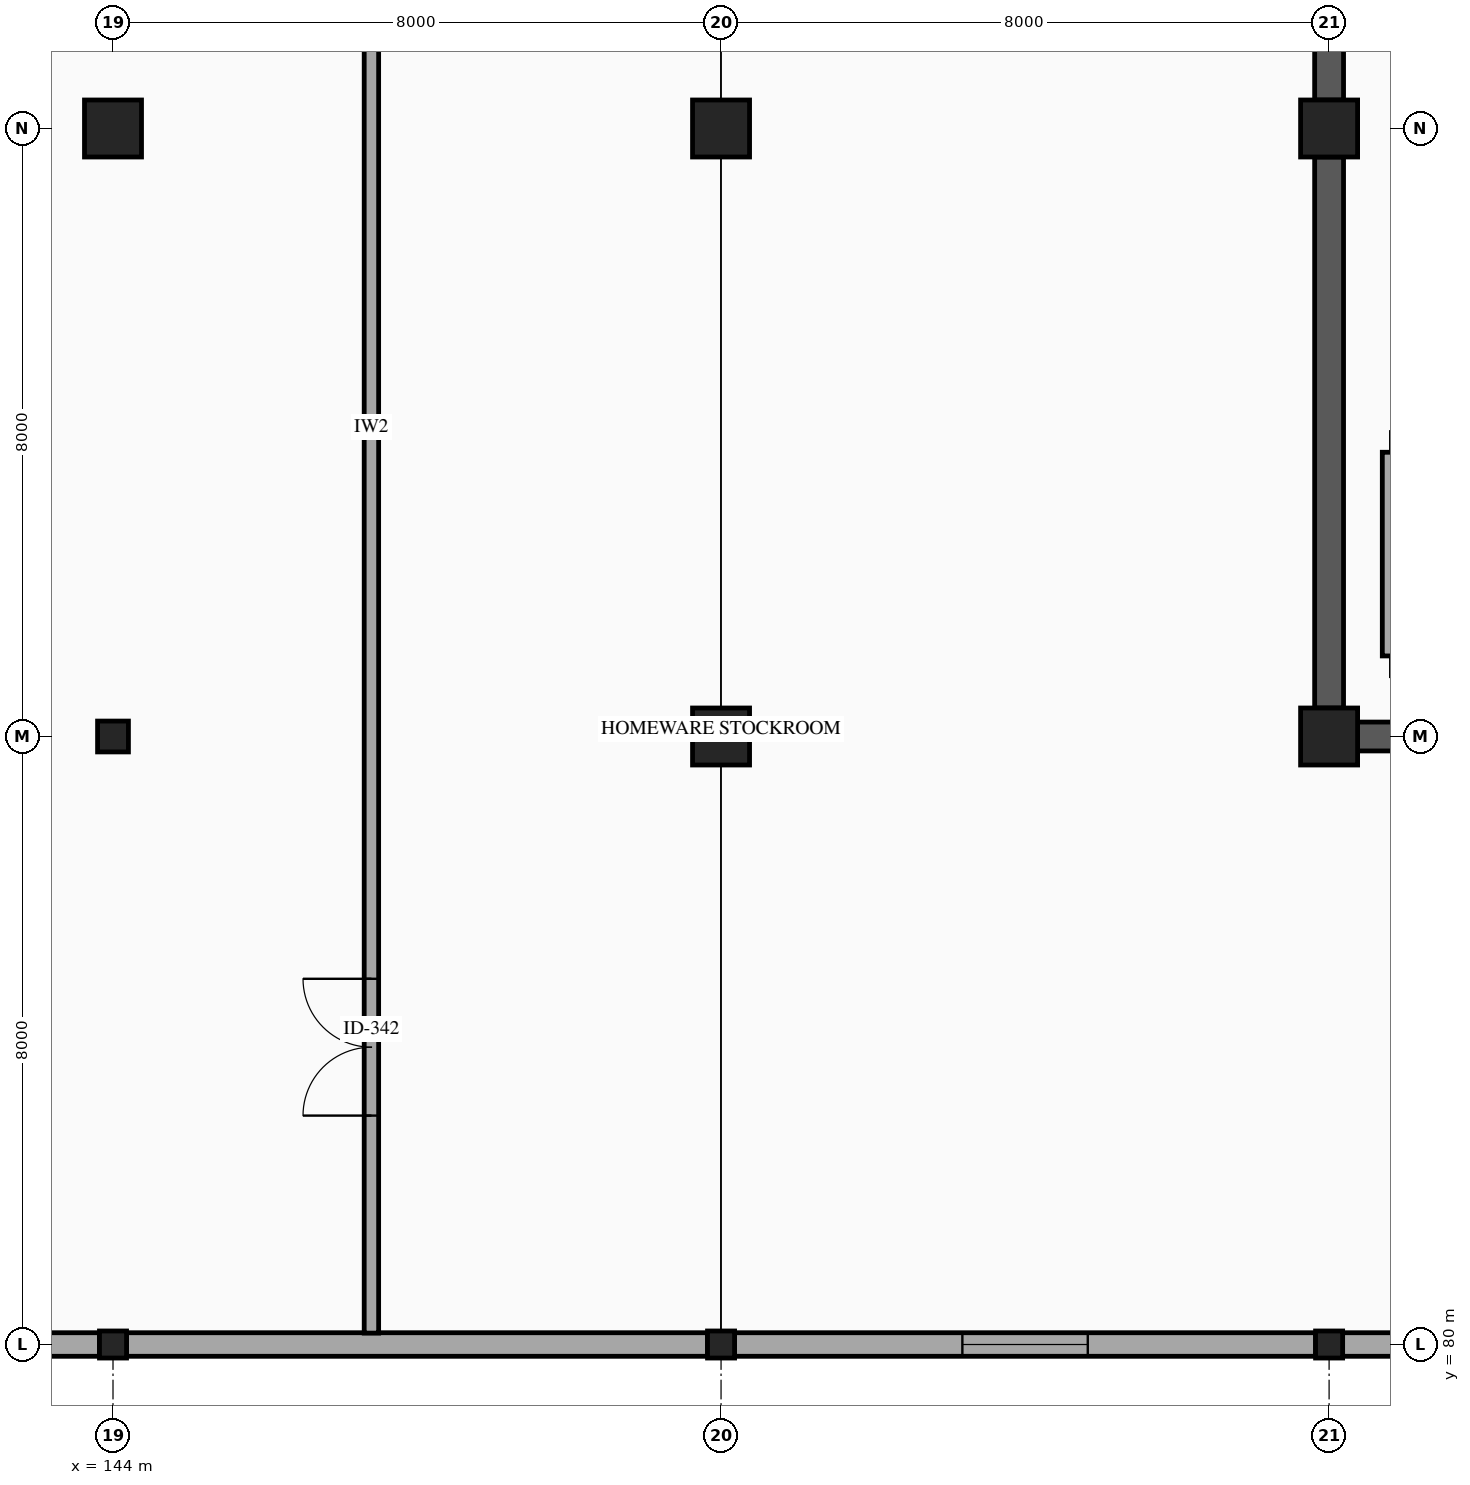
"""IFC4 building model, lengths in metres.
Left out: names, types, materials, properties, quantities, classifications, styles, units other than length and angle.
Written with IfcOpenShell. Run it as: python <this file> out.ifc"""

import sys

from ifc_helpers import new_model, si_unit, direction, frame, frame_2d, origin, origin_2d, place, context, subcontext, project, spatial, rectangle, hollow_rectangle, hollow_circle, extrude, element, fill, save


model = new_model("IFC4")
c1 = context("Model", 3, precision=1e-05, world=origin(), true_north=direction((0.0, 1.0)))
c2 = subcontext(c1, "Body", "Model", "MODEL_VIEW")
j1 = project(units=[si_unit("LENGTHUNIT", "METRE"), si_unit("PLANEANGLEUNIT", "RADIAN")], contexts=[c1])
p1 = place(None, origin())
s1 = spatial("IfcSite", under=j1, at=p1, CompositionType="ELEMENT")
p2 = place(p1, origin())
s2 = spatial("IfcBuilding", under=s1, at=p2, CompositionType="ELEMENT")
p3 = place(p2, frame((0.0, 0.0, 14.9)))
s3 = spatial("IfcBuildingStorey", under=s2, at=p3, CompositionType="ELEMENT", Elevation=14.9)
p4 = place(p3, frame((144.0, 80.0, 0.0), z_axis=(0.0, 0.0, 1.0), x_axis=(1.0, 0.0, 0.0)))
e1 = element("IfcColumn", 1, at=p4, inside=s3, PredefinedType="COLUMN", context=c2, shape_type="SweptSolid", body=[
    extrude(hollow_rectangle(XDim=0.356, YDim=0.356, WallThickness=0.012, InnerFilletRadius=0.012, OuterFilletRadius=0.024, at=origin_2d()), origin(), (0.0, 0.0, 1.0), 4.5),
])
p5 = place(p3, frame((144.0, 88.0, 0.0), z_axis=(0.0, 0.0, 1.0), x_axis=(1.0, 0.0, 0.0)))
e2 = element("IfcColumn", 2, at=p5, inside=s3, PredefinedType="COLUMN", context=c2, shape_type="SweptSolid", body=[
    extrude(hollow_circle(Radius=0.203, WallThickness=0.012, at=origin_2d()), origin(), (0.0, 0.0, 1.0), 4.5),
])
p6 = place(p3, frame((144.0, 96.0, 0.0), z_axis=(0.0, 0.0, 1.0), x_axis=(1.0, 0.0, 0.0)))
e3 = element("IfcColumn", 3, at=p6, inside=s3, PredefinedType="COLUMN", context=c2, shape_type="SweptSolid", body=[
    extrude(rectangle(XDim=0.75, YDim=0.75, at=origin_2d()), origin(), (0.0, 0.0, 1.0), 4.5),
])
p7 = place(p3, frame((152.0, 80.0, 0.0), z_axis=(0.0, 0.0, 1.0), x_axis=(1.0, 0.0, 0.0)))
e4 = element("IfcColumn", 4, at=p7, inside=s3, PredefinedType="COLUMN", context=c2, shape_type="SweptSolid", body=[
    extrude(hollow_rectangle(XDim=0.356, YDim=0.356, WallThickness=0.012, InnerFilletRadius=0.012, OuterFilletRadius=0.024, at=origin_2d()), origin(), (0.0, 0.0, 1.0), 4.5),
])
for number, where, z_axis, x_axis in (
    (5, (152.0, 88.0, 0.0), (0.0, 0.0, 1.0), (1.0, 0.0, 0.0)),
    (6, (152.0, 96.0, 0.0), (0.0, 0.0, 1.0), (1.0, 0.0, 0.0)),
):
    element("IfcColumn", number, at=place(p3, frame(where, z_axis=z_axis, x_axis=x_axis)), inside=s3, PredefinedType="COLUMN", context=c2, shape_type="SweptSolid", body=[
        extrude(rectangle(XDim=0.75, YDim=0.75, at=origin_2d()), origin(), (0.0, 0.0, 1.0), 4.5),
    ])
p8 = place(p3, frame((160.0, 80.0, 0.0), z_axis=(0.0, 0.0, 1.0), x_axis=(1.0, 0.0, 0.0)))
e7 = element("IfcColumn", 7, at=p8, inside=s3, PredefinedType="COLUMN", context=c2, shape_type="SweptSolid", body=[
    extrude(hollow_rectangle(XDim=0.356, YDim=0.356, WallThickness=0.012, InnerFilletRadius=0.012, OuterFilletRadius=0.024, at=origin_2d()), origin(), (0.0, 0.0, 1.0), 4.5),
])
for number, where, z_axis, x_axis in (
    (8, (160.0, 88.0, 0.0), (0.0, 0.0, 1.0), (1.0, 0.0, 0.0)),
    (9, (160.0, 96.0, 0.0), (0.0, 0.0, 1.0), (1.0, 0.0, 0.0)),
):
    element("IfcColumn", number, at=place(p3, frame(where, z_axis=z_axis, x_axis=x_axis)), inside=s3, PredefinedType="COLUMN", context=c2, shape_type="SweptSolid", body=[
        extrude(rectangle(XDim=0.75, YDim=0.75, at=origin_2d()), origin(), (0.0, 0.0, 1.0), 4.5),
    ])
p9 = place(p3, frame((167.822, 80.0, 0.0), z_axis=(0.0, 0.0, 1.0), x_axis=(-1.0, 0.0, 0.0)))
e10 = element("IfcWall", 10, at=p9, inside=s3, PredefinedType="STANDARD", context=c2, shape_type="SweptSolid", body=[
    extrude(rectangle(XDim=7.644, YDim=0.31, at=frame_2d((3.822, 0.0))), origin(), (0.0, 0.0, 1.0), 3.48),
])
p10 = place(p9, frame((2.997, 0.0, 0.8)))
e11 = element("IfcOpeningElement", 11, at=p10, cuts=e10, PredefinedType="OPENING", context=c2, shape_type="SweptSolid", body=[
    extrude(rectangle(XDim=1.65, YDim=2.3, at=frame_2d((0.825, 1.15))), frame((0.0, 0.165, 0.0), z_axis=(0.0, -1.0, 0.0), x_axis=(1.0, 0.0, 0.0)), (0.0, 0.0, 1.0), 0.33),
])
p11 = place(p3, frame((159.822, 80.0, 0.0), z_axis=(0.0, 0.0, 1.0), x_axis=(-1.0, 0.0, 0.0)))
e12 = element("IfcWall", 12, at=p11, inside=s3, PredefinedType="STANDARD", context=c2, shape_type="SweptSolid", body=[
    extrude(rectangle(XDim=7.644, YDim=0.31, at=frame_2d((3.822, 0.0))), origin(), (0.0, 0.0, 1.0), 3.48),
])
p12 = place(p11, frame((2.997, 0.0, 0.8)))
e13 = element("IfcOpeningElement", 13, at=p12, cuts=e12, PredefinedType="OPENING", context=c2, shape_type="SweptSolid", body=[
    extrude(rectangle(XDim=1.65, YDim=2.3, at=frame_2d((0.825, 1.15))), frame((0.0, 0.165, 0.0), z_axis=(0.0, -1.0, 0.0), x_axis=(1.0, 0.0, 0.0)), (0.0, 0.0, 1.0), 0.33),
])
p13 = place(p3, frame((151.822, 80.0, 0.0), z_axis=(0.0, 0.0, 1.0), x_axis=(-1.0, 0.0, 0.0)))
e14 = element("IfcWall", 14, at=p13, inside=s3, PredefinedType="STANDARD", context=c2, shape_type="SweptSolid", body=[
    extrude(rectangle(XDim=7.644, YDim=0.31, at=frame_2d((3.822, 0.0))), origin(), (0.0, 0.0, 1.0), 3.48),
])
p14 = place(p3, frame((143.822, 80.0, 0.0), z_axis=(0.0, 0.0, 1.0), x_axis=(-1.0, 0.0, 0.0)))
e15 = element("IfcWall", 15, at=p14, inside=s3, PredefinedType="STANDARD", context=c2, shape_type="SweptSolid", body=[
    extrude(rectangle(XDim=7.644, YDim=0.31, at=frame_2d((3.822, 0.0))), origin(), (0.0, 0.0, 1.0), 3.48),
])
p15 = place(p14, frame((2.997, 0.0, 0.8)))
e16 = element("IfcOpeningElement", 16, at=p15, cuts=e15, PredefinedType="OPENING", context=c2, shape_type="SweptSolid", body=[
    extrude(rectangle(XDim=1.65, YDim=2.3, at=frame_2d((0.825, 1.15))), frame((0.0, 0.165, 0.0), z_axis=(0.0, -1.0, 0.0), x_axis=(1.0, 0.0, 0.0)), (0.0, 0.0, 1.0), 0.33),
])
for number, where, z_axis, x_axis in (
    (17, (160.375, 88.0, 0.0), (0.0, 0.0, 1.0), (1.0, 0.0, 0.0)),
    (18, (160.0, 88.375, 0.0), (0.0, 0.0, 1.0), (0.0, 1.0, 0.0)),
    (19, (160.0, 96.375, 0.0), (0.0, 0.0, 1.0), (0.0, 1.0, 0.0)),
):
    element("IfcWall", number, at=place(p3, frame(where, z_axis=z_axis, x_axis=x_axis)), inside=s3, PredefinedType="SHEAR", context=c2, shape_type="SweptSolid", body=[
        extrude(rectangle(XDim=7.25, YDim=0.38, at=frame_2d((3.625, 0.0))), origin(), (0.0, 0.0, 1.0), 4.28),
    ])
p16 = place(p3, frame((160.82, 89.06, 0.0), z_axis=(0.0, 0.0, 1.0), x_axis=(0.0, 1.0, 0.0)))
e20 = element("IfcWall", 20, at=p16, inside=s3, PredefinedType="PARTITIONING", context=c2, shape_type="SweptSolid", body=[
    extrude(rectangle(XDim=2.68, YDim=0.24, at=frame_2d((1.34, 0.0))), origin(), (0.0, 0.0, 1.0), 4.28),
])
p17 = place(p3, frame((147.4, 80.15, 0.0), z_axis=(0.0, 0.0, 1.0), x_axis=(0.0, 1.0, 0.0)))
e21 = element("IfcWall", 21, at=p17, inside=s3, PredefinedType="PARTITIONING", context=c2, shape_type="SweptSolid", body=[
    extrude(rectangle(XDim=23.85, YDim=0.19, at=frame_2d((11.925, 0.0))), origin(), (0.0, 0.0, 1.0), 3.48),
])
p18 = place(p17, frame((2.862, 0.0, 0.0)))
e22 = element("IfcOpeningElement", 22, at=p18, cuts=e21, PredefinedType="OPENING", context=c2, shape_type="SweptSolid", body=[
    extrude(rectangle(XDim=1.8, YDim=2.25, at=frame_2d((0.9, 1.125))), frame((0.0, 0.105, 0.0), z_axis=(0.0, -1.0, 0.0), x_axis=(1.0, 0.0, 0.0)), (0.0, 0.0, 1.0), 0.21),
])
p19 = place(p12, origin())
e23 = element("IfcWindow", 23, at=p19, inside=s3, PartitioningType="DOUBLE_PANEL_HORIZONTAL", PredefinedType="WINDOW", context=c2, shape_type="SweptSolid", body=[
    extrude(rectangle(XDim=1.65, YDim=2.3, at=frame_2d((0.825, 1.15))), frame((0.0, 0.03, 0.0), z_axis=(0.0, -1.0, 0.0), x_axis=(1.0, 0.0, 0.0)), (0.0, 0.0, 1.0), 0.06),
])
fill(e13, e23)
p20 = place(p18, origin())
e24 = element("IfcDoor", 24, at=p20, inside=s3, OperationType="DOUBLE_DOOR_SINGLE_SWING", PredefinedType="DOOR", context=c2, shape_type="SweptSolid", body=[
    extrude(rectangle(XDim=1.8, YDim=2.25, at=frame_2d((0.9, 1.125))), frame((0.0, 0.025, 0.0), z_axis=(0.0, -1.0, 0.0), x_axis=(1.0, 0.0, 0.0)), (0.0, 0.0, 1.0), 0.05),
])
fill(e22, e24)
save(model, sys.argv[1])
